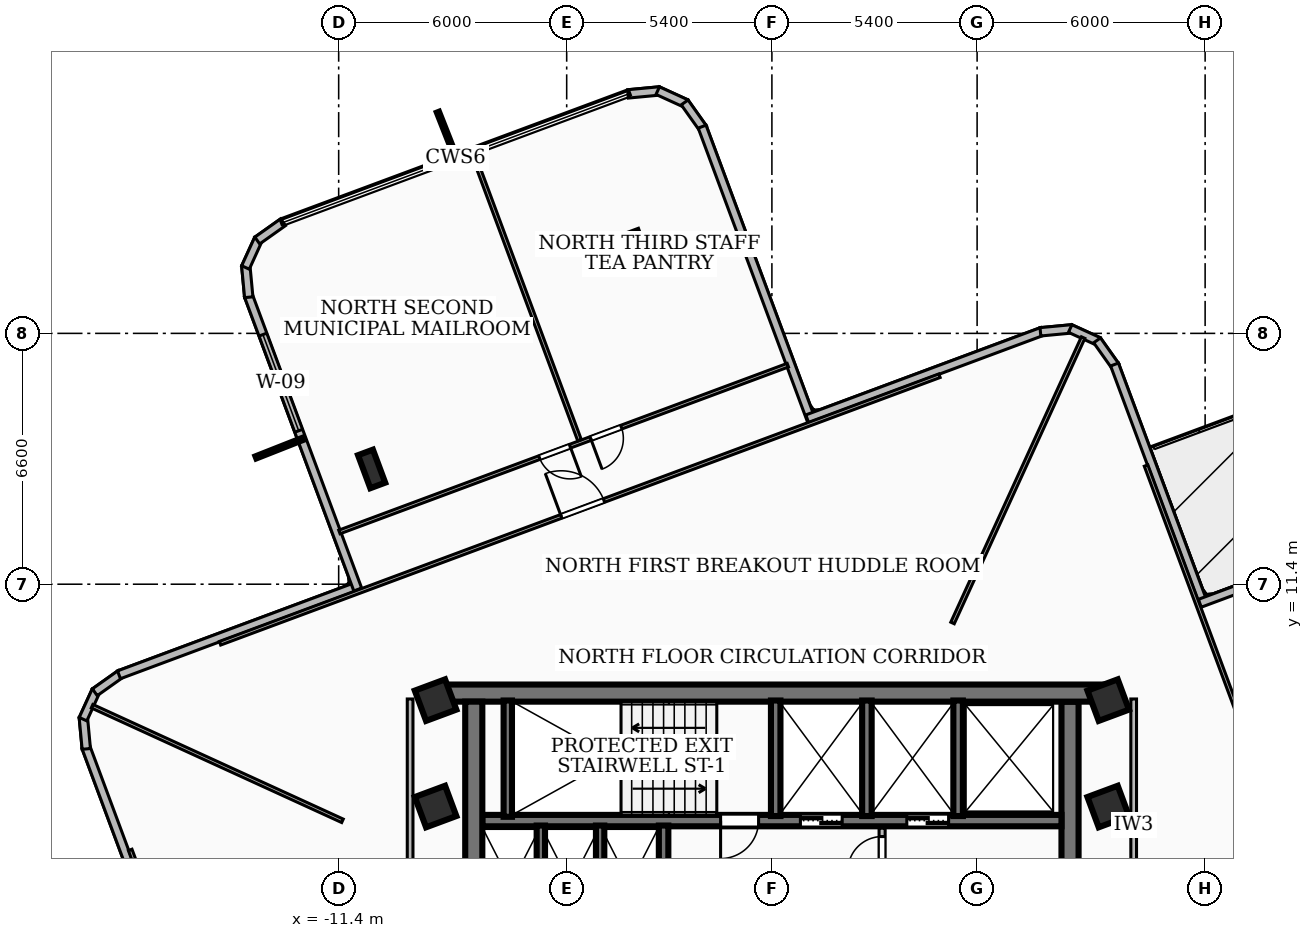
"""IFC4 building model, lengths in metres.
Left out: names, types, materials, properties, quantities, classifications, styles, units other than length and angle.
Written with IfcOpenShell. Run it as: python <this file> out.ifc"""

import sys

from ifc_helpers import new_model, si_unit, direction, frame, frame_2d, origin, origin_2d, place, context, subcontext, project, spatial, rectangle, i_section, extrude, element, fill, save


model = new_model("IFC4")
c1 = context("Model", 3, precision=1e-05, world=origin(), true_north=direction((0.0, 1.0)))
c2 = subcontext(c1, "Body", "Model", "MODEL_VIEW")
j1 = project(units=[si_unit("LENGTHUNIT", "METRE"), si_unit("PLANEANGLEUNIT", "RADIAN")], contexts=[c1])
p1 = place(None, origin())
s1 = spatial("IfcSite", under=j1, at=p1, CompositionType="ELEMENT")
p2 = place(p1, origin())
s2 = spatial("IfcBuilding", under=s1, at=p2, CompositionType="ELEMENT")
p3 = place(p2, frame((0.0, 0.0, 170.28)))
s3 = spatial("IfcBuildingStorey", under=s2, at=p3, CompositionType="ELEMENT", Elevation=170.28)
p4 = place(p3, frame((-8.78, 8.535, 0.0), z_axis=(0.0, 0.0, 1.0), x_axis=(1.0, 0.0, 0.0)))
e1 = element("IfcWall", 1, at=p4, inside=s3, PredefinedType="SHEAR", context=c2, shape_type="SweptSolid", body=[
    extrude(rectangle(XDim=17.56, YDim=0.45, at=frame_2d((8.78, 0.0))), origin(), (0.0, 0.0, 1.0), 3.34),
])
for number, where, z_axis, x_axis in (
    (2, (-7.845, 1.975, 0.0), (0.0, 0.0, 1.0), (0.0, 1.0, 0.0)),
    (3, (7.845, 8.31, 0.0), (0.0, 0.0, 1.0), (0.0, -1.0, 0.0)),
):
    element("IfcWall", number, at=place(p3, frame(where, z_axis=z_axis, x_axis=x_axis)), inside=s3, PredefinedType="SHEAR", context=c2, shape_type="SweptSolid", body=[
        extrude(rectangle(XDim=6.335, YDim=0.45, at=frame_2d((3.167, 0.0))), origin(), (0.0, 0.0, 1.0), 3.34),
    ])
p5 = place(p3, frame((7.62, 5.18, 0.0), z_axis=(0.0, 0.0, 1.0), x_axis=(-1.0, 0.0, 0.0)))
e4 = element("IfcWall", 4, at=p5, inside=s3, PredefinedType="SOLIDWALL", context=c2, shape_type="SweptSolid", body=[
    extrude(rectangle(XDim=15.24, YDim=0.3, at=frame_2d((7.62, 0.0))), origin(), (0.0, 0.0, 1.0), 3.34),
])
p6 = place(p5, frame((5.77, 0.0, 0.0)))
e5 = element("IfcOpeningElement", 5, at=p6, cuts=e4, PredefinedType="OPENING", context=c2, shape_type="SweptSolid", body=[
    extrude(rectangle(XDim=1.1, YDim=2.15, at=frame_2d((0.55, 1.075))), frame((0.0, 0.16, 0.0), z_axis=(0.0, -1.0, 0.0), x_axis=(1.0, 0.0, 0.0)), (0.0, 0.0, 1.0), 0.32),
])
p7 = place(p5, frame((2.97, 0.0, 0.0)))
e6 = element("IfcOpeningElement", 6, at=p7, cuts=e4, PredefinedType="OPENING", context=c2, shape_type="SweptSolid", body=[
    extrude(rectangle(XDim=1.1, YDim=2.15, at=frame_2d((0.55, 1.075))), frame((0.0, 0.16, 0.0), z_axis=(0.0, -1.0, 0.0), x_axis=(1.0, 0.0, 0.0)), (0.0, 0.0, 1.0), 0.32),
])
p8 = place(p5, frame((7.97, 0.0, 0.0)))
e7 = element("IfcOpeningElement", 7, at=p8, cuts=e4, PredefinedType="OPENING", context=c2, shape_type="SweptSolid", body=[
    extrude(rectangle(XDim=1.0, YDim=2.1, at=frame_2d((0.5, 1.05))), frame((0.0, 0.16, 0.0), z_axis=(0.0, -1.0, 0.0), x_axis=(1.0, 0.0, 0.0)), (0.0, 0.0, 1.0), 0.32),
])
p9 = place(p3, frame((-6.95, 5.28, 0.0), z_axis=(0.0, 0.0, 1.0), x_axis=(0.0, 1.0, 0.0)))
e8 = element("IfcWall", 8, at=p9, inside=s3, PredefinedType="SOLIDWALL", context=c2, shape_type="SweptSolid", body=[
    extrude(rectangle(XDim=3.06, YDim=0.22, at=frame_2d((1.53, 0.0))), origin(), (0.0, 0.0, 1.0), 3.34),
])
for number, where, z_axis, x_axis in (
    (9, (0.1, 5.3, 0.0), (0.0, 0.0, 1.0), (0.0, 1.0, 0.0)),
    (10, (2.5, 5.3, 0.0), (0.0, 0.0, 1.0), (0.0, 1.0, 0.0)),
    (11, (4.9, 5.3, 0.0), (0.0, 0.0, 1.0), (0.0, 1.0, 0.0)),
):
    element("IfcWall", number, at=place(p3, frame(where, z_axis=z_axis, x_axis=x_axis)), inside=s3, PredefinedType="SOLIDWALL", context=c2, shape_type="SweptSolid", body=[
        extrude(rectangle(XDim=3.04, YDim=0.25, at=frame_2d((1.52, 0.0))), origin(), (0.0, 0.0, 1.0), 3.34),
    ])
p10 = place(p3, frame((-2.85, 1.98, 0.0), z_axis=(0.0, 0.0, 1.0), x_axis=(0.0, 1.0, 0.0)))
e12 = element("IfcWall", 12, at=p10, inside=s3, PredefinedType="SOLIDWALL", context=c2, shape_type="SweptSolid", body=[
    extrude(rectangle(XDim=3.07, YDim=0.25, at=frame_2d((1.535, 0.0))), origin(), (0.0, 0.0, 1.0), 3.34),
])
for number, where, z_axis, x_axis in (
    (13, (-6.08, 1.98, 0.0), (0.0, 0.0, 1.0), (0.0, 1.0, 0.0)),
    (14, (-4.52, 1.98, 0.0), (0.0, 0.0, 1.0), (0.0, 1.0, 0.0)),
):
    element("IfcWall", number, at=place(p3, frame(where, z_axis=z_axis, x_axis=x_axis)), inside=s3, PredefinedType="SOLIDWALL", context=c2, shape_type="SweptSolid", body=[
        extrude(rectangle(XDim=3.07, YDim=0.22, at=frame_2d((1.535, 0.0))), origin(), (0.0, 0.0, 1.0), 3.34),
    ])
for number, where, z_axis, x_axis in (
    (15, (-8.85, 5.55, 0.0), (0.0, 0.0, 1.0), (0.937, 0.349, 0.0)),
    (16, (8.85, 5.55, 0.0), (0.0, 0.0, 1.0), (0.937, 0.349, 0.0)),
    (17, (-8.85, 8.35, 0.0), (0.0, 0.0, 1.0), (0.937, 0.349, 0.0)),
    (18, (8.85, 8.35, 0.0), (0.0, 0.0, 1.0), (0.937, 0.349, 0.0)),
):
    element("IfcColumn", number, at=place(p3, frame(where, z_axis=z_axis, x_axis=x_axis)), inside=s3, PredefinedType="COLUMN", context=c2, shape_type="SweptSolid", body=[
        extrude(rectangle(XDim=0.85, YDim=0.85, at=origin_2d()), origin(), (0.0, 0.0, 1.0), 3.6),
    ])
for number, where, z_axis, x_axis in (
    (19, (-3.57, 20.207, 0.0), (0.0, 0.0, 1.0), (0.937, 0.349, 0.0)),
    (20, (-10.533, 14.433, 0.0), (0.0, 0.0, 1.0), (0.937, 0.349, 0.0)),
):
    element("IfcColumn", number, at=place(p3, frame(where, z_axis=z_axis, x_axis=x_axis)), inside=s3, PredefinedType="COLUMN", context=c2, shape_type="SweptSolid", body=[
        extrude(i_section(OverallWidth=0.418, OverallDepth=0.927, WebThickness=0.019, FlangeThickness=0.032, at=origin_2d()), origin(), (0.0, 0.0, 1.0), 3.6),
    ])
p11 = place(p3, frame((-15.751, 0.93, 0.0), z_axis=(0.0, 0.0, 1.0), x_axis=(-0.348729932868, 0.937223257246, 0.0)))
e21 = element("IfcWall", 21, at=p11, inside=s3, PredefinedType="SOLIDWALL", context=c2, shape_type="SweptSolid", body=[
    extrude(rectangle(XDim=6.598, YDim=0.22, at=frame_2d((3.299, 0.0))), origin(), (0.0, 0.0, 1.0), 3.34),
])
p12 = place(p3, frame((-18.041, 7.066, 0.0), z_axis=(0.0, 0.0, 1.0), x_axis=(-0.09330446586, 0.995637623159, 0.0)))
e22 = element("IfcWall", 22, at=p12, inside=s3, PredefinedType="SOLIDWALL", context=c2, shape_type="SweptSolid", body=[
    extrude(rectangle(XDim=0.835, YDim=0.22, at=frame_2d((0.417, 0.0))), origin(), (0.0, 0.0, 1.0), 3.34),
])
p13 = place(p3, frame((-18.127, 7.849, 0.0), z_axis=(0.0, 0.0, 1.0), x_axis=(0.415083126143, 0.909783489843, 0.0)))
e23 = element("IfcWall", 23, at=p13, inside=s3, PredefinedType="SOLIDWALL", context=c2, shape_type="SweptSolid", body=[
    extrude(rectangle(XDim=0.819, YDim=0.22, at=frame_2d((0.409, 0.0))), origin(), (0.0, 0.0, 1.0), 3.34),
])
p14 = place(p3, frame((-17.817, 8.557, 0.0), z_axis=(0.0, 0.0, 1.0), x_axis=(0.815315167698, 0.579017424022, 0.0)))
e24 = element("IfcWall", 24, at=p14, inside=s3, PredefinedType="SOLIDWALL", context=c2, shape_type="SweptSolid", body=[
    extrude(rectangle(XDim=0.833, YDim=0.22, at=frame_2d((0.417, 0.0))), origin(), (0.0, 0.0, 1.0), 3.34),
])
p15 = place(p3, frame((-17.181, 9.016, 0.0), z_axis=(0.0, 0.0, 1.0), x_axis=(0.937216908499, 0.34874699486, 0.0)))
e25 = element("IfcWall", 25, at=p15, inside=s3, PredefinedType="SOLIDWALL", context=c2, shape_type="SweptSolid", body=[
    extrude(rectangle(XDim=6.758, YDim=0.22, at=frame_2d((3.379, 0.0))), origin(), (0.0, 0.0, 1.0), 3.34),
])
p16 = place(p3, frame((-10.898, 11.26, 0.0), z_axis=(0.0, 0.0, 1.0), x_axis=(-0.348682373258, 0.937240952252, 0.0)))
e26 = element("IfcWall", 26, at=p16, inside=s3, PredefinedType="SOLIDWALL", context=c2, shape_type="SweptSolid", body=[
    extrude(rectangle(XDim=8.257, YDim=0.22, at=frame_2d((4.129, 0.0))), origin(), (0.0, 0.0, 1.0), 3.34),
])
p17 = place(p16, frame((4.457, 0.0, 0.85)))
e27 = element("IfcOpeningElement", 27, at=p17, cuts=e26, PredefinedType="OPENING", context=c2, shape_type="SweptSolid", body=[
    extrude(rectangle(XDim=2.7, YDim=1.65, at=frame_2d((1.35, 0.825))), frame((0.0, 0.12, 0.0), z_axis=(0.0, -1.0, 0.0), x_axis=(1.0, 0.0, 0.0)), (0.0, 0.0, 1.0), 0.24),
])
p18 = place(p3, frame((-13.766, 18.951, 0.0), z_axis=(0.0, 0.0, 1.0), x_axis=(-0.09330446586, 0.995637623159, 0.0)))
e28 = element("IfcWall", 28, at=p18, inside=s3, PredefinedType="SOLIDWALL", context=c2, shape_type="SweptSolid", body=[
    extrude(rectangle(XDim=0.835, YDim=0.22, at=frame_2d((0.417, 0.0))), origin(), (0.0, 0.0, 1.0), 3.34),
])
p19 = place(p3, frame((-13.852, 19.734, 0.0), z_axis=(0.0, 0.0, 1.0), x_axis=(0.41476734413, 0.909927497245, 0.0)))
e29 = element("IfcWall", 29, at=p19, inside=s3, PredefinedType="SOLIDWALL", context=c2, shape_type="SweptSolid", body=[
    extrude(rectangle(XDim=0.82, YDim=0.22, at=frame_2d((0.41, 0.0))), origin(), (0.0, 0.0, 1.0), 3.34),
])
p20 = place(p3, frame((-13.542, 20.443, 0.0), z_axis=(0.0, 0.0, 1.0), x_axis=(0.815845967165, 0.578269277984, 0.0)))
e30 = element("IfcWall", 30, at=p20, inside=s3, PredefinedType="SOLIDWALL", context=c2, shape_type="SweptSolid", body=[
    extrude(rectangle(XDim=0.833, YDim=0.22, at=frame_2d((0.417, 0.0))), origin(), (0.0, 0.0, 1.0), 3.34),
])
p21 = place(p3, frame((-3.787, 24.301, 0.0), z_axis=(0.0, 0.0, 1.0), x_axis=(0.995637623159, 0.09330446586, 0.0)))
e31 = element("IfcWall", 31, at=p21, inside=s3, PredefinedType="SOLIDWALL", context=c2, shape_type="SweptSolid", body=[
    extrude(rectangle(XDim=0.835, YDim=0.22, at=frame_2d((0.417, 0.0))), origin(), (0.0, 0.0, 1.0), 3.34),
])
p22 = place(p3, frame((-3.004, 24.387, 0.0), z_axis=(0.0, 0.0, 1.0), x_axis=(0.909783489843, -0.415083126143, 0.0)))
e32 = element("IfcWall", 32, at=p22, inside=s3, PredefinedType="SOLIDWALL", context=c2, shape_type="SweptSolid", body=[
    extrude(rectangle(XDim=0.819, YDim=0.22, at=frame_2d((0.409, 0.0))), origin(), (0.0, 0.0, 1.0), 3.34),
])
p23 = place(p3, frame((-2.296, 24.077, 0.0), z_axis=(0.0, 0.0, 1.0), x_axis=(0.579048422224, -0.815293152626, 0.0)))
e33 = element("IfcWall", 33, at=p23, inside=s3, PredefinedType="SOLIDWALL", context=c2, shape_type="SweptSolid", body=[
    extrude(rectangle(XDim=0.834, YDim=0.22, at=frame_2d((0.417, 0.0))), origin(), (0.0, 0.0, 1.0), 3.34),
])
p24 = place(p3, frame((-1.836, 23.44, 0.0), z_axis=(0.0, 0.0, 1.0), x_axis=(0.348617756986, -0.937264988952, 0.0)))
e34 = element("IfcWall", 34, at=p24, inside=s3, PredefinedType="SOLIDWALL", context=c2, shape_type="SweptSolid", body=[
    extrude(rectangle(XDim=8.258, YDim=0.22, at=frame_2d((4.129, 0.0))), origin(), (0.0, 0.0, 1.0), 2.644),
])
p25 = place(p3, frame((0.93, 15.751, 0.0), z_axis=(0.0, 0.0, 1.0), x_axis=(0.937223257246, 0.348729932868, 0.0)))
e35 = element("IfcWall", 35, at=p25, inside=s3, PredefinedType="SOLIDWALL", context=c2, shape_type="SweptSolid", body=[
    extrude(rectangle(XDim=6.598, YDim=0.22, at=frame_2d((3.299, 0.0))), origin(), (0.0, 0.0, 1.0), 2.644),
])
p26 = place(p3, frame((7.066, 18.041, 0.0), z_axis=(0.0, 0.0, 1.0), x_axis=(0.995637623159, 0.09330446586, 0.0)))
e36 = element("IfcWall", 36, at=p26, inside=s3, PredefinedType="SOLIDWALL", context=c2, shape_type="SweptSolid", body=[
    extrude(rectangle(XDim=0.835, YDim=0.22, at=frame_2d((0.417, 0.0))), origin(), (0.0, 0.0, 1.0), 3.34),
])
p27 = place(p3, frame((7.849, 18.127, 0.0), z_axis=(0.0, 0.0, 1.0), x_axis=(0.909783489843, -0.415083126143, 0.0)))
e37 = element("IfcWall", 37, at=p27, inside=s3, PredefinedType="SOLIDWALL", context=c2, shape_type="SweptSolid", body=[
    extrude(rectangle(XDim=0.819, YDim=0.22, at=frame_2d((0.409, 0.0))), origin(), (0.0, 0.0, 1.0), 3.34),
])
p28 = place(p3, frame((8.557, 17.817, 0.0), z_axis=(0.0, 0.0, 1.0), x_axis=(0.579017424022, -0.815315167698, 0.0)))
e38 = element("IfcWall", 38, at=p28, inside=s3, PredefinedType="SOLIDWALL", context=c2, shape_type="SweptSolid", body=[
    extrude(rectangle(XDim=0.833, YDim=0.22, at=frame_2d((0.417, 0.0))), origin(), (0.0, 0.0, 1.0), 3.34),
])
p29 = place(p3, frame((9.016, 17.181, 0.0), z_axis=(0.0, 0.0, 1.0), x_axis=(0.34874699486, -0.937216908499, 0.0)))
e39 = element("IfcWall", 39, at=p29, inside=s3, PredefinedType="SOLIDWALL", context=c2, shape_type="SweptSolid", body=[
    extrude(rectangle(XDim=6.758, YDim=0.22, at=frame_2d((3.379, 0.0))), origin(), (0.0, 0.0, 1.0), 2.644),
])
p30 = place(p3, frame((11.26, 10.898, 0.0), z_axis=(0.0, 0.0, 1.0), x_axis=(0.937247074189, 0.348665917354, 0.0)))
e40 = element("IfcWall", 40, at=p30, inside=s3, PredefinedType="SOLIDWALL", context=c2, shape_type="SweptSolid", body=[
    extrude(rectangle(XDim=9.858, YDim=0.22, at=frame_2d((4.929, 0.0))), origin(), (0.0, 0.0, 1.0), 2.644),
])
p31 = place(p30, frame((4.4, 0.0, 0.0)))
e41 = element("IfcOpeningElement", 41, at=p31, cuts=e40, PredefinedType="OPENING", context=c2, shape_type="SweptSolid", body=[
    extrude(rectangle(XDim=1.1, YDim=2.1, at=frame_2d((0.55, 1.05))), frame((0.0, 0.12, 0.0), z_axis=(0.0, -1.0, 0.0), x_axis=(1.0, 0.0, 0.0)), (0.0, 0.0, 1.0), 0.24),
])
p32 = place(p3, frame((2.9, 2.04, 0.0), z_axis=(0.0, 0.0, 1.0), x_axis=(0.0, 1.0, 0.0)))
e42 = element("IfcWall", 42, at=p32, inside=s3, PredefinedType="PARTITIONING", context=c2, shape_type="SweptSolid", body=[
    extrude(rectangle(XDim=2.94, YDim=0.16, at=frame_2d((1.47, 0.0))), origin(), (0.0, 0.0, 1.0), 2.57),
])
p33 = place(p32, frame((1.82, 0.0, 0.0)))
e43 = element("IfcOpeningElement", 43, at=p33, cuts=e42, PredefinedType="OPENING", context=c2, shape_type="SweptSolid", body=[
    extrude(rectangle(XDim=0.9, YDim=2.06, at=frame_2d((0.45, 1.03))), frame((0.0, 0.09, 0.0), z_axis=(0.0, -1.0, 0.0), x_axis=(1.0, 0.0, 0.0)), (0.0, 0.0, 1.0), 0.18),
])
p34 = place(p3, frame((-9.52, 1.75, 0.0), z_axis=(0.0, 0.0, 1.0), x_axis=(0.0, 1.0, 0.0)))
e44 = element("IfcWall", 44, at=p34, inside=s3, PredefinedType="PARTITIONING", context=c2, shape_type="SweptSolid", body=[
    extrude(rectangle(XDim=6.63, YDim=0.15, at=frame_2d((3.315, 0.0))), origin(), (0.0, 0.0, 1.0), 3.34),
])
p35 = place(p3, frame((9.52, 1.75, 0.0), z_axis=(0.0, 0.0, 1.0), x_axis=(0.0, 1.0, 0.0)))
e45 = element("IfcWall", 45, at=p35, inside=s3, PredefinedType="PARTITIONING", context=c2, shape_type="SweptSolid", body=[
    extrude(rectangle(XDim=6.63, YDim=0.15, at=frame_2d((3.315, 0.0))), origin(), (0.0, 0.0, 1.0), 2.644),
])
p36 = place(p3, frame((4.753, 10.38, 0.0), z_axis=(0.0, 0.0, 1.0), x_axis=(0.416191484634, 0.909276991966, 0.0)))
e46 = element("IfcWall", 46, at=p36, inside=s3, PredefinedType="PARTITIONING", context=c2, shape_type="SweptSolid", body=[
    extrude(rectangle(XDim=8.258, YDim=0.1, at=frame_2d((4.129, 0.0))), origin(), (0.0, 0.0, 1.0), 2.644),
])
p37 = place(p3, frame((-11.3, 5.174, 0.0), z_axis=(0.0, 0.0, 1.0), x_axis=(-0.909275268701, 0.416195249528, 0.0)))
e47 = element("IfcWall", 47, at=p37, inside=s3, PredefinedType="PARTITIONING", context=c2, shape_type="SweptSolid", body=[
    extrude(rectangle(XDim=7.246, YDim=0.1, at=frame_2d((3.623, 0.0))), origin(), (0.0, 0.0, 1.0), 3.34),
])
p38 = place(p3, frame((9.846, 14.522, 0.0), z_axis=(0.0, 0.0, 1.0), x_axis=(0.348543090668, -0.937292757866, 0.0)))
e48 = element("IfcWall", 48, at=p38, inside=s3, PredefinedType="PARTITIONING", context=c2, shape_type="SweptSolid", body=[
    extrude(rectangle(XDim=20.198, YDim=0.1, at=frame_2d((10.099, 0.0))), origin(), (0.0, 0.0, 1.0), 2.644),
])
p39 = place(p38, frame((9.579, 0.0, 0.0)))
e49 = element("IfcOpeningElement", 49, at=p39, cuts=e48, PredefinedType="OPENING", context=c2, shape_type="SweptSolid", body=[
    extrude(rectangle(XDim=1.2, YDim=2.1, at=frame_2d((0.6, 1.05))), frame((0.0, 0.06, 0.0), z_axis=(0.0, -1.0, 0.0), x_axis=(1.0, 0.0, 0.0)), (0.0, 0.0, 1.0), 0.12),
])
p40 = place(p3, frame((-14.522, 9.846, 0.0), z_axis=(0.0, 0.0, 1.0), x_axis=(0.937292757866, 0.348543090668, 0.0)))
e50 = element("IfcWall", 50, at=p40, inside=s3, PredefinedType="PARTITIONING", context=c2, shape_type="SweptSolid", body=[
    extrude(rectangle(XDim=20.198, YDim=0.1, at=frame_2d((10.099, 0.0))), origin(), (0.0, 0.0, 1.0), 2.644),
])
p41 = place(p40, frame((9.579, 0.0, 0.0)))
e51 = element("IfcOpeningElement", 51, at=p41, cuts=e50, PredefinedType="OPENING", context=c2, shape_type="SweptSolid", body=[
    extrude(rectangle(XDim=1.2, YDim=2.1, at=frame_2d((0.6, 1.05))), frame((0.0, 0.06, 0.0), z_axis=(0.0, -1.0, 0.0), x_axis=(1.0, 0.0, 0.0)), (0.0, 0.0, 1.0), 0.12),
])
p42 = place(p3, frame((-5.062, 15.188, 0.0), z_axis=(0.0, 0.0, 1.0), x_axis=(-0.348454946531, 0.937325530559, 0.0)))
e52 = element("IfcWall", 52, at=p42, inside=s3, PredefinedType="PARTITIONING", context=c2, shape_type="SweptSolid", body=[
    extrude(rectangle(XDim=8.015, YDim=0.1, at=frame_2d((4.008, 0.0))), origin(), (0.0, 0.0, 1.0), 2.644),
])
p43 = place(p3, frame((0.419, 17.163, 0.0), z_axis=(0.0, 0.0, 1.0), x_axis=(-0.937262231235, -0.348625171066, 0.0)))
e53 = element("IfcWall", 53, at=p43, inside=s3, PredefinedType="PARTITIONING", context=c2, shape_type="SweptSolid", body=[
    extrude(rectangle(XDim=12.59, YDim=0.1, at=frame_2d((6.295, 0.0))), origin(), (0.0, 0.0, 1.0), 2.644),
])
p44 = place(p43, frame((4.675, 0.0, 0.0)))
e54 = element("IfcOpeningElement", 54, at=p44, cuts=e53, PredefinedType="OPENING", context=c2, shape_type="SweptSolid", body=[
    extrude(rectangle(XDim=0.86, YDim=2.04, at=frame_2d((0.43, 1.02))), frame((0.0, 0.06, 0.0), z_axis=(0.0, -1.0, 0.0), x_axis=(1.0, 0.0, 0.0)), (0.0, 0.0, 1.0), 0.12),
])
p45 = place(p43, frame((6.115, 0.0, 0.0)))
e55 = element("IfcOpeningElement", 55, at=p45, cuts=e53, PredefinedType="OPENING", context=c2, shape_type="SweptSolid", body=[
    extrude(rectangle(XDim=0.86, YDim=2.04, at=frame_2d((0.43, 1.02))), frame((0.0, 0.06, 0.0), z_axis=(0.0, -1.0, 0.0), x_axis=(1.0, 0.0, 0.0)), (0.0, 0.0, 1.0), 0.12),
])
p46 = place(p3, frame((-9.846, -14.522, 0.0), z_axis=(0.0, 0.0, 1.0), x_axis=(-0.348543090668, 0.937292757866, 0.0)))
e56 = element("IfcWall", 56, at=p46, inside=s3, PredefinedType="PARTITIONING", context=c2, shape_type="SweptSolid", body=[
    extrude(rectangle(XDim=20.198, YDim=0.1, at=frame_2d((10.099, 0.0))), origin(), (0.0, 0.0, 1.0), 2.644),
])
p47 = place(p46, frame((9.579, 0.0, 0.0)))
e57 = element("IfcOpeningElement", 57, at=p47, cuts=e56, PredefinedType="OPENING", context=c2, shape_type="SweptSolid", body=[
    extrude(rectangle(XDim=1.2, YDim=2.1, at=frame_2d((0.6, 1.05))), frame((0.0, 0.06, 0.0), z_axis=(0.0, -1.0, 0.0), x_axis=(1.0, 0.0, 0.0)), (0.0, 0.0, 1.0), 0.12),
])
p48 = place(p17, origin())
e58 = element("IfcWindow", 58, at=p48, inside=s3, PartitioningType="SINGLE_PANEL", PredefinedType="WINDOW", context=c2, shape_type="SweptSolid", body=[
    extrude(rectangle(XDim=2.7, YDim=1.65, at=frame_2d((1.35, 0.825))), frame((0.0, 0.03, 0.0), z_axis=(0.0, -1.0, 0.0), x_axis=(1.0, 0.0, 0.0)), (0.0, 0.0, 1.0), 0.06),
])
fill(e27, e58)
p49 = place(p6, origin())
e59 = element("IfcDoor", 59, at=p49, inside=s3, OperationType="DOUBLE_DOOR_SLIDING", PredefinedType="DOOR", context=c2, shape_type="SweptSolid", body=[
    extrude(rectangle(XDim=1.1, YDim=2.15, at=frame_2d((0.55, 1.075))), frame((0.0, 0.025, 0.0), z_axis=(0.0, -1.0, 0.0), x_axis=(1.0, 0.0, 0.0)), (0.0, 0.0, 1.0), 0.05),
])
fill(e5, e59)
p50 = place(p7, origin())
e60 = element("IfcDoor", 60, at=p50, inside=s3, OperationType="DOUBLE_DOOR_SLIDING", PredefinedType="DOOR", context=c2, shape_type="SweptSolid", body=[
    extrude(rectangle(XDim=1.1, YDim=2.15, at=frame_2d((0.55, 1.075))), frame((0.0, 0.025, 0.0), z_axis=(0.0, -1.0, 0.0), x_axis=(1.0, 0.0, 0.0)), (0.0, 0.0, 1.0), 0.05),
])
fill(e6, e60)
p51 = place(p8, origin())
e61 = element("IfcDoor", 61, at=p51, inside=s3, OperationType="SINGLE_SWING_RIGHT", PredefinedType="DOOR", context=c2, shape_type="SweptSolid", body=[
    extrude(rectangle(XDim=1.0, YDim=2.1, at=frame_2d((0.5, 1.05))), frame((0.0, 0.025, 0.0), z_axis=(0.0, -1.0, 0.0), x_axis=(1.0, 0.0, 0.0)), (0.0, 0.0, 1.0), 0.05),
])
fill(e7, e61)
p52 = place(p33, origin())
e62 = element("IfcDoor", 62, at=p52, inside=s3, OperationType="SINGLE_SWING_LEFT", PredefinedType="DOOR", context=c2, shape_type="SweptSolid", body=[
    extrude(rectangle(XDim=0.9, YDim=2.06, at=frame_2d((0.45, 1.03))), frame((0.0, 0.025, 0.0), z_axis=(0.0, -1.0, 0.0), x_axis=(1.0, 0.0, 0.0)), (0.0, 0.0, 1.0), 0.05),
])
fill(e43, e62)
p53 = place(p41, origin())
e63 = element("IfcDoor", 63, at=p53, inside=s3, OperationType="SINGLE_SWING_LEFT", PredefinedType="DOOR", context=c2, shape_type="SweptSolid", body=[
    extrude(rectangle(XDim=1.2, YDim=2.1, at=frame_2d((0.6, 1.05))), frame((0.0, 0.025, 0.0), z_axis=(0.0, -1.0, 0.0), x_axis=(1.0, 0.0, 0.0)), (0.0, 0.0, 1.0), 0.05),
])
fill(e51, e63)
p54 = place(p44, origin())
e64 = element("IfcDoor", 64, at=p54, inside=s3, OperationType="SINGLE_SWING_RIGHT", PredefinedType="DOOR", context=c2, shape_type="SweptSolid", body=[
    extrude(rectangle(XDim=0.86, YDim=2.04, at=frame_2d((0.43, 1.02))), frame((0.0, 0.025, 0.0), z_axis=(0.0, -1.0, 0.0), x_axis=(1.0, 0.0, 0.0)), (0.0, 0.0, 1.0), 0.05),
])
fill(e54, e64)
p55 = place(p45, origin())
e65 = element("IfcDoor", 65, at=p55, inside=s3, OperationType="SINGLE_SWING_LEFT", PredefinedType="DOOR", context=c2, shape_type="SweptSolid", body=[
    extrude(rectangle(XDim=0.86, YDim=2.04, at=frame_2d((0.43, 1.02))), frame((0.0, 0.025, 0.0), z_axis=(0.0, -1.0, 0.0), x_axis=(1.0, 0.0, 0.0)), (0.0, 0.0, 1.0), 0.05),
])
fill(e55, e65)
save(model, sys.argv[1])
